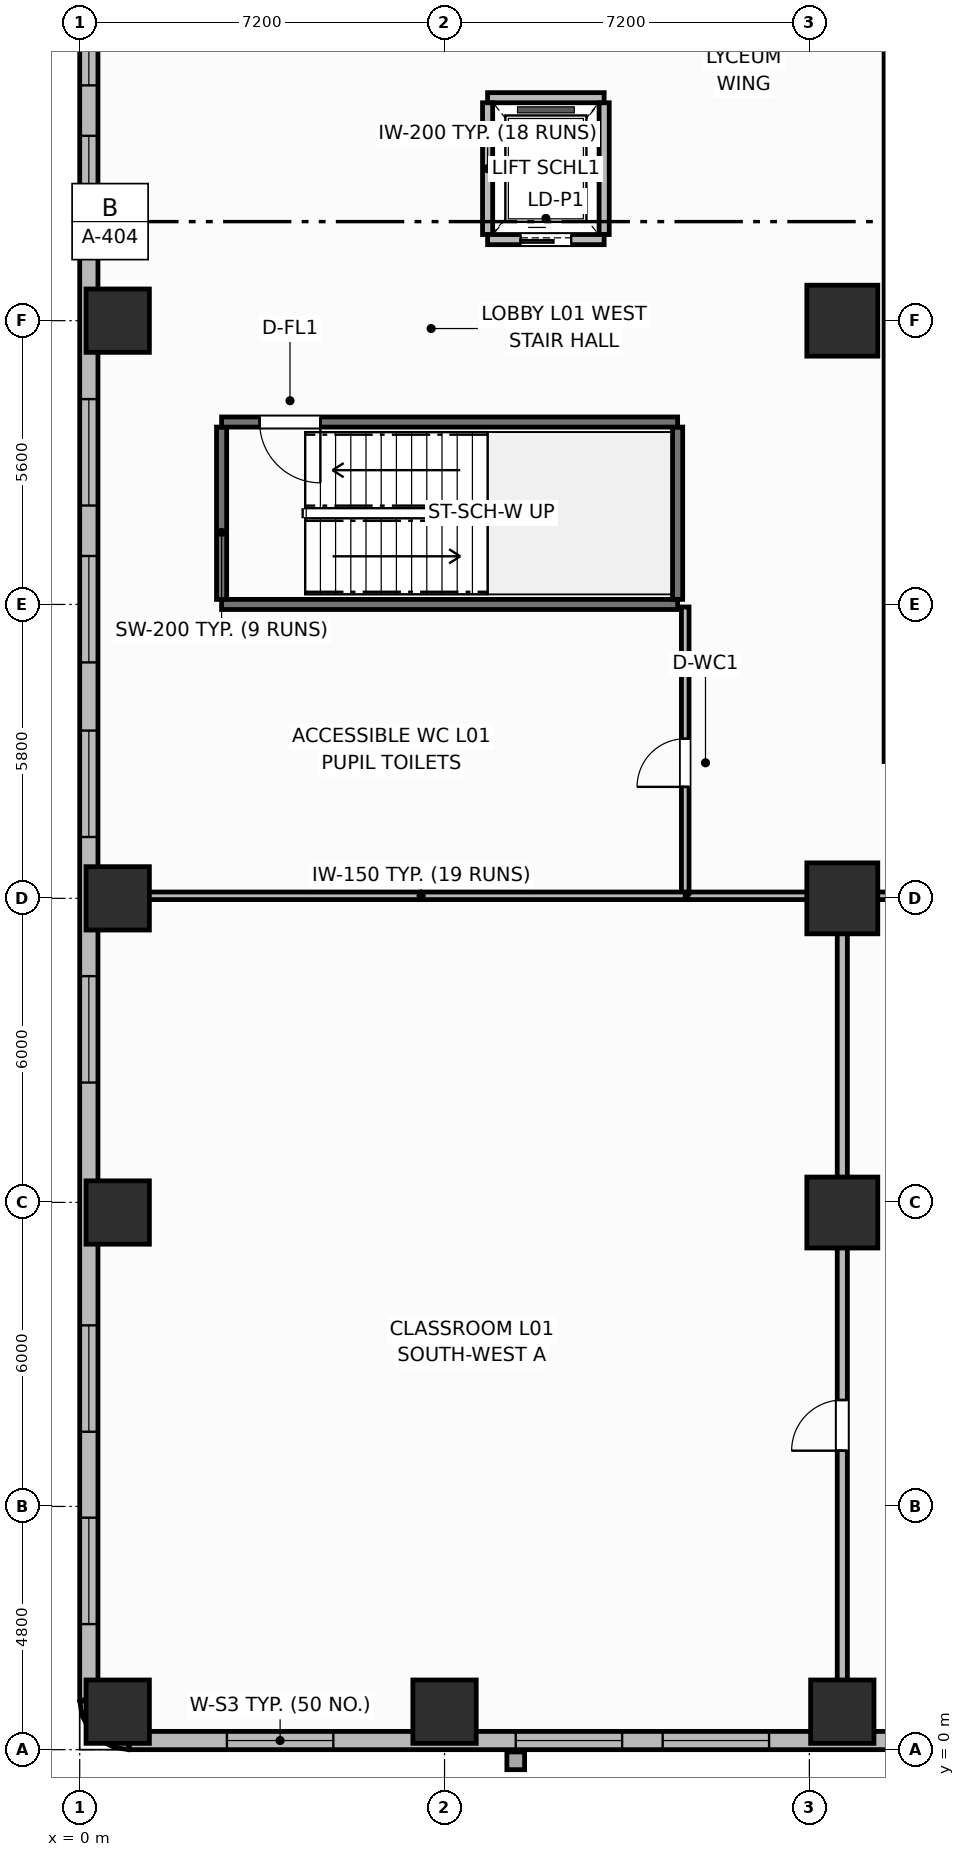
"""IFC4 building model, lengths in metres.
Left out: names, types, materials, properties, quantities, classifications, styles, units other than length and angle.
Written with IfcOpenShell. Run it as: python <this file> out.ifc"""

import sys

from ifc_helpers import new_model, si_unit, direction, frame, frame_2d, origin, origin_2d, place, context, subcontext, project, spatial, rectangle, extrude, element, fill, save


model = new_model("IFC4")
c1 = context("Model", 3, precision=1e-05, world=origin(), true_north=direction((0.0, 1.0)))
c2 = subcontext(c1, "Body", "Model", "MODEL_VIEW")
j1 = project(units=[si_unit("LENGTHUNIT", "METRE"), si_unit("PLANEANGLEUNIT", "RADIAN")], contexts=[c1])
p1 = place(None, origin())
s1 = spatial("IfcSite", under=j1, at=p1, CompositionType="ELEMENT")
p2 = place(p1, origin())
s2 = spatial("IfcBuilding", under=s1, at=p2, CompositionType="ELEMENT")
p3 = place(p2, frame((0.0, 0.0, 6.6)))
s3 = spatial("IfcBuildingStorey", under=s2, at=p3, CompositionType="ELEMENT", Elevation=6.6)
for number, where, z_axis, x_axis in (
    (1, (0.75, 0.75, 0.0), (0.0, 0.0, 1.0), (1.0, 0.0, 0.0)),
    (2, (0.75, 10.6, 0.0), (0.0, 0.0, 1.0), (1.0, 0.0, 0.0)),
    (3, (0.75, 16.8, 0.0), (0.0, 0.0, 1.0), (1.0, 0.0, 0.0)),
    (4, (0.75, 28.2, 0.0), (0.0, 0.0, 1.0), (1.0, 0.0, 0.0)),
    (5, (7.2, 0.75, 0.0), (0.0, 0.0, 1.0), (1.0, 0.0, 0.0)),
    (6, (15.05, 0.75, 0.0), (0.0, 0.0, 1.0), (1.0, 0.0, 0.0)),
):
    element("IfcColumn", number, at=place(p3, frame(where, z_axis=z_axis, x_axis=x_axis)), inside=s3, PredefinedType="COLUMN", context=c2, shape_type="SweptSolid", body=[
        extrude(rectangle(XDim=1.25, YDim=1.25, at=origin_2d()), origin(), (0.0, 0.0, 1.0), 4.5),
    ])
for number, where, z_axis, x_axis in (
    (7, (15.05, 10.6, 0.0), (0.0, 0.0, 1.0), (1.0, 0.0, 0.0)),
    (8, (15.05, 16.8, 0.0), (0.0, 0.0, 1.0), (1.0, 0.0, 0.0)),
    (9, (15.05, 28.2, 0.0), (0.0, 0.0, 1.0), (1.0, 0.0, 0.0)),
):
    element("IfcColumn", number, at=place(p3, frame(where, z_axis=z_axis, x_axis=x_axis)), inside=s3, PredefinedType="COLUMN", context=c2, shape_type="SweptSolid", body=[
        extrude(rectangle(XDim=1.4, YDim=1.4, at=origin_2d()), origin(), (0.0, 0.0, 1.0), 4.5),
    ])
for number, where, z_axis, x_axis in (
    (10, (0.18, 0.98, 0.0), (0.0, 0.0, 1.0), (0.157, -0.988, 0.0)),
    (11, (0.219, 0.733, 0.0), (0.0, 0.0, 1.0), (0.453, -0.891, 0.0)),
    (12, (0.333, 0.51, 0.0), (0.0, 0.0, 1.0), (0.707, -0.707, 0.0)),
    (13, (0.51, 0.333, 0.0), (0.0, 0.0, 1.0), (0.891, -0.453, 0.0)),
    (14, (0.733, 0.219, 0.0), (0.0, 0.0, 1.0), (0.988, -0.157, 0.0)),
):
    element("IfcWall", number, at=place(p3, frame(where, z_axis=z_axis, x_axis=x_axis)), inside=s3, PredefinedType="SOLIDWALL", context=c2, shape_type="SweptSolid", body=[
        extrude(rectangle(XDim=0.25, YDim=0.36, at=frame_2d((0.125, 0.0))), origin(), (0.0, 0.0, 1.0), 3.48),
    ])
p4 = place(p3, frame((0.98, 0.18, 0.0), z_axis=(0.0, 0.0, 1.0), x_axis=(1.0, 0.0, 0.0)))
e15 = element("IfcWall", 15, at=p4, inside=s3, PredefinedType="SOLIDWALL", context=c2, shape_type="SweptSolid", body=[
    extrude(rectangle(XDim=15.25, YDim=0.36, at=frame_2d((7.625, 0.0))), origin(), (0.0, 0.0, 1.0), 3.48),
])
p5 = place(p4, frame((1.925, 0.0, 0.85)))
e16 = element("IfcOpeningElement", 16, at=p5, cuts=e15, PredefinedType="OPENING", context=c2, shape_type="SweptSolid", body=[
    extrude(rectangle(XDim=2.1, YDim=2.2, at=frame_2d((1.05, 1.1))), frame((0.0, 0.19, 0.0), z_axis=(0.0, -1.0, 0.0), x_axis=(1.0, 0.0, 0.0)), (0.0, 0.0, 1.0), 0.38),
])
p6 = place(p4, frame((7.625, 0.0, 0.85)))
e17 = element("IfcOpeningElement", 17, at=p6, cuts=e15, PredefinedType="OPENING", context=c2, shape_type="SweptSolid", body=[
    extrude(rectangle(XDim=2.1, YDim=2.2, at=frame_2d((1.05, 1.1))), frame((0.0, 0.19, 0.0), z_axis=(0.0, -1.0, 0.0), x_axis=(1.0, 0.0, 0.0)), (0.0, 0.0, 1.0), 0.38),
])
p7 = place(p4, frame((10.525, 0.0, 0.85)))
e18 = element("IfcOpeningElement", 18, at=p7, cuts=e15, PredefinedType="OPENING", context=c2, shape_type="SweptSolid", body=[
    extrude(rectangle(XDim=2.1, YDim=2.2, at=frame_2d((1.05, 1.1))), frame((0.0, 0.19, 0.0), z_axis=(0.0, -1.0, 0.0), x_axis=(1.0, 0.0, 0.0)), (0.0, 0.0, 1.0), 0.38),
])
p8 = place(p3, frame((0.18, 55.42, 0.0), z_axis=(0.0, 0.0, 1.0), x_axis=(0.0, -1.0, 0.0)))
e19 = element("IfcWall", 19, at=p8, inside=s3, PredefinedType="SOLIDWALL", context=c2, shape_type="SweptSolid", body=[
    extrude(rectangle(XDim=54.44, YDim=0.36, at=frame_2d((27.22, 0.0))), origin(), (0.0, 0.0, 1.0), 3.48),
])
p9 = place(p8, frame((1.498, 0.0, 0.85)))
e20 = element("IfcOpeningElement", 20, at=p9, cuts=e19, PredefinedType="OPENING", context=c2, shape_type="SweptSolid", body=[
    extrude(rectangle(XDim=2.1, YDim=2.2, at=frame_2d((1.05, 1.1))), frame((0.0, 0.19, 0.0), z_axis=(0.0, -1.0, 0.0), x_axis=(1.0, 0.0, 0.0)), (0.0, 0.0, 1.0), 0.38),
])
p10 = place(p8, frame((5.294, 0.0, 0.85)))
e21 = element("IfcOpeningElement", 21, at=p10, cuts=e19, PredefinedType="OPENING", context=c2, shape_type="SweptSolid", body=[
    extrude(rectangle(XDim=2.1, YDim=2.2, at=frame_2d((1.05, 1.1))), frame((0.0, 0.19, 0.0), z_axis=(0.0, -1.0, 0.0), x_axis=(1.0, 0.0, 0.0)), (0.0, 0.0, 1.0), 0.38),
])
p11 = place(p8, frame((12.185, 0.0, 0.85)))
e22 = element("IfcOpeningElement", 22, at=p11, cuts=e19, PredefinedType="OPENING", context=c2, shape_type="SweptSolid", body=[
    extrude(rectangle(XDim=2.1, YDim=2.2, at=frame_2d((1.05, 1.1))), frame((0.0, 0.19, 0.0), z_axis=(0.0, -1.0, 0.0), x_axis=(1.0, 0.0, 0.0)), (0.0, 0.0, 1.0), 0.38),
])
p12 = place(p8, frame((17.031, 0.0, 0.85)))
e23 = element("IfcOpeningElement", 23, at=p12, cuts=e19, PredefinedType="OPENING", context=c2, shape_type="SweptSolid", body=[
    extrude(rectangle(XDim=2.1, YDim=2.2, at=frame_2d((1.05, 1.1))), frame((0.0, 0.19, 0.0), z_axis=(0.0, -1.0, 0.0), x_axis=(1.0, 0.0, 0.0)), (0.0, 0.0, 1.0), 0.38),
])
p13 = place(p8, frame((20.476, 0.0, 0.85)))
e24 = element("IfcOpeningElement", 24, at=p13, cuts=e19, PredefinedType="OPENING", context=c2, shape_type="SweptSolid", body=[
    extrude(rectangle(XDim=2.1, YDim=2.2, at=frame_2d((1.05, 1.1))), frame((0.0, 0.19, 0.0), z_axis=(0.0, -1.0, 0.0), x_axis=(1.0, 0.0, 0.0)), (0.0, 0.0, 1.0), 0.38),
])
p14 = place(p8, frame((23.572, 0.0, 0.85)))
e25 = element("IfcOpeningElement", 25, at=p14, cuts=e19, PredefinedType="OPENING", context=c2, shape_type="SweptSolid", body=[
    extrude(rectangle(XDim=2.1, YDim=2.2, at=frame_2d((1.05, 1.1))), frame((0.0, 0.19, 0.0), z_axis=(0.0, -1.0, 0.0), x_axis=(1.0, 0.0, 0.0)), (0.0, 0.0, 1.0), 0.38),
])
p15 = place(p8, frame((28.768, 0.0, 0.85)))
e26 = element("IfcOpeningElement", 26, at=p15, cuts=e19, PredefinedType="OPENING", context=c2, shape_type="SweptSolid", body=[
    extrude(rectangle(XDim=2.1, YDim=2.2, at=frame_2d((1.05, 1.1))), frame((0.0, 0.19, 0.0), z_axis=(0.0, -1.0, 0.0), x_axis=(1.0, 0.0, 0.0)), (0.0, 0.0, 1.0), 0.38),
])
p16 = place(p8, frame((31.864, 0.0, 0.85)))
e27 = element("IfcOpeningElement", 27, at=p16, cuts=e19, PredefinedType="OPENING", context=c2, shape_type="SweptSolid", body=[
    extrude(rectangle(XDim=2.1, YDim=2.2, at=frame_2d((1.05, 1.1))), frame((0.0, 0.19, 0.0), z_axis=(0.0, -1.0, 0.0), x_axis=(1.0, 0.0, 0.0)), (0.0, 0.0, 1.0), 0.38),
])
p17 = place(p8, frame((35.309, 0.0, 0.85)))
e28 = element("IfcOpeningElement", 28, at=p17, cuts=e19, PredefinedType="OPENING", context=c2, shape_type="SweptSolid", body=[
    extrude(rectangle(XDim=2.1, YDim=2.2, at=frame_2d((1.05, 1.1))), frame((0.0, 0.19, 0.0), z_axis=(0.0, -1.0, 0.0), x_axis=(1.0, 0.0, 0.0)), (0.0, 0.0, 1.0), 0.38),
])
p18 = place(p8, frame((40.155, 0.0, 0.85)))
e29 = element("IfcOpeningElement", 29, at=p18, cuts=e19, PredefinedType="OPENING", context=c2, shape_type="SweptSolid", body=[
    extrude(rectangle(XDim=2.1, YDim=2.2, at=frame_2d((1.05, 1.1))), frame((0.0, 0.19, 0.0), z_axis=(0.0, -1.0, 0.0), x_axis=(1.0, 0.0, 0.0)), (0.0, 0.0, 1.0), 0.38),
])
p19 = place(p8, frame((47.046, 0.0, 0.85)))
e30 = element("IfcOpeningElement", 30, at=p19, cuts=e19, PredefinedType="OPENING", context=c2, shape_type="SweptSolid", body=[
    extrude(rectangle(XDim=2.1, YDim=2.2, at=frame_2d((1.05, 1.1))), frame((0.0, 0.19, 0.0), z_axis=(0.0, -1.0, 0.0), x_axis=(1.0, 0.0, 0.0)), (0.0, 0.0, 1.0), 0.38),
])
p20 = place(p8, frame((50.842, 0.0, 0.85)))
e31 = element("IfcOpeningElement", 31, at=p20, cuts=e19, PredefinedType="OPENING", context=c2, shape_type="SweptSolid", body=[
    extrude(rectangle(XDim=2.1, YDim=2.2, at=frame_2d((1.05, 1.1))), frame((0.0, 0.19, 0.0), z_axis=(0.0, -1.0, 0.0), x_axis=(1.0, 0.0, 0.0)), (0.0, 0.0, 1.0), 0.38),
])
p21 = place(p3, frame((2.8, 22.6, 0.0), z_axis=(0.0, 0.0, 1.0), x_axis=(1.0, 0.0, 0.0)))
e32 = element("IfcWall", 32, at=p21, inside=s3, PredefinedType="SHEAR", context=c2, shape_type="SweptSolid", body=[
    extrude(rectangle(XDim=9.0, YDim=0.2, at=frame_2d((4.5, 0.0))), origin(), (0.0, 0.0, 1.0), 4.5),
])
for number, where, z_axis, x_axis in (
    (33, (2.8, 22.7, 0.0), (0.0, 0.0, 1.0), (0.0, 1.0, 0.0)),
    (34, (11.8, 22.7, 0.0), (0.0, 0.0, 1.0), (0.0, 1.0, 0.0)),
):
    element("IfcWall", number, at=place(p3, frame(where, z_axis=z_axis, x_axis=x_axis)), inside=s3, PredefinedType="SHEAR", context=c2, shape_type="SweptSolid", body=[
        extrude(rectangle(XDim=3.4, YDim=0.2, at=frame_2d((1.7, 0.0))), origin(), (0.0, 0.0, 1.0), 4.5),
    ])
p22 = place(p3, frame((11.8, 26.2, 0.0), z_axis=(0.0, 0.0, 1.0), x_axis=(-1.0, 0.0, 0.0)))
e35 = element("IfcWall", 35, at=p22, inside=s3, PredefinedType="SHEAR", context=c2, shape_type="SweptSolid", body=[
    extrude(rectangle(XDim=9.0, YDim=0.2, at=frame_2d((4.5, 0.0))), origin(), (0.0, 0.0, 1.0), 4.5),
])
p23 = place(p22, frame((7.05, 0.0, 0.0)))
e36 = element("IfcOpeningElement", 36, at=p23, cuts=e35, PredefinedType="OPENING", context=c2, shape_type="SweptSolid", body=[
    extrude(rectangle(XDim=1.2, YDim=2.15, at=frame_2d((0.6, 1.075))), frame((0.0, 0.11, 0.0), z_axis=(0.0, -1.0, 0.0), x_axis=(1.0, 0.0, 0.0)), (0.0, 0.0, 1.0), 0.22),
])
p24 = place(p3, frame((8.05, 32.6, 0.0), z_axis=(0.0, 0.0, 1.0), x_axis=(1.0, 0.0, 0.0)))
e37 = element("IfcWall", 37, at=p24, inside=s3, PredefinedType="PARTITIONING", context=c2, shape_type="SweptSolid", body=[
    extrude(rectangle(XDim=2.3, YDim=0.2, at=frame_2d((1.15, 0.0))), origin(), (0.0, 0.0, 1.0), 3.42),
])
for number, where, z_axis, x_axis in (
    (38, (8.05, 29.9, 0.0), (0.0, 0.0, 1.0), (0.0, 1.0, 0.0)),
    (39, (10.35, 29.9, 0.0), (0.0, 0.0, 1.0), (0.0, 1.0, 0.0)),
):
    element("IfcWall", number, at=place(p3, frame(where, z_axis=z_axis, x_axis=x_axis)), inside=s3, PredefinedType="PARTITIONING", context=c2, shape_type="SweptSolid", body=[
        extrude(rectangle(XDim=2.6, YDim=0.2, at=frame_2d((1.3, 0.0))), origin(), (0.0, 0.0, 1.0), 3.42),
    ])
p25 = place(p3, frame((8.05, 29.8, 0.0), z_axis=(0.0, 0.0, 1.0), x_axis=(1.0, 0.0, 0.0)))
e40 = element("IfcWall", 40, at=p25, inside=s3, PredefinedType="PARTITIONING", context=c2, shape_type="SweptSolid", body=[
    extrude(rectangle(XDim=2.3, YDim=0.2, at=frame_2d((1.15, 0.0))), origin(), (0.0, 0.0, 1.0), 3.42),
])
p26 = place(p25, frame((0.65, 0.0, 0.0)))
e41 = element("IfcOpeningElement", 41, at=p26, cuts=e40, PredefinedType="OPENING", context=c2, shape_type="SweptSolid", body=[
    extrude(rectangle(XDim=1.0, YDim=2.15, at=frame_2d((0.5, 1.075))), frame((0.0, 0.11, 0.0), z_axis=(0.0, -1.0, 0.0), x_axis=(1.0, 0.0, 0.0)), (0.0, 0.0, 1.0), 0.22),
])
p27 = place(p3, frame((15.95, 19.5, 0.0), z_axis=(0.0, 0.0, 1.0), x_axis=(0.0, 1.0, 0.0)))
e42 = element("IfcWall", 42, at=p27, inside=s3, PredefinedType="PARTITIONING", context=c2, shape_type="SweptSolid", body=[
    extrude(rectangle(XDim=17.4, YDim=0.15, at=frame_2d((8.7, 0.0))), origin(), (0.0, 0.0, 1.0), 3.42),
])
p28 = place(p3, frame((15.05, 0.4, 0.0), z_axis=(0.0, 0.0, 1.0), x_axis=(0.0, 1.0, 0.0)))
e43 = element("IfcWall", 43, at=p28, inside=s3, PredefinedType="PARTITIONING", context=c2, shape_type="SweptSolid", body=[
    extrude(rectangle(XDim=16.4, YDim=0.2, at=frame_2d((8.2, 0.0))), origin(), (0.0, 0.0, 1.0), 3.42),
])
p29 = place(p28, frame((5.5, 0.0, 0.0)))
e44 = element("IfcOpeningElement", 44, at=p29, cuts=e43, PredefinedType="OPENING", context=c2, shape_type="SweptSolid", body=[
    extrude(rectangle(XDim=1.0, YDim=2.15, at=frame_2d((0.5, 1.075))), frame((0.0, 0.11, 0.0), z_axis=(0.0, -1.0, 0.0), x_axis=(1.0, 0.0, 0.0)), (0.0, 0.0, 1.0), 0.22),
])
p30 = place(p3, frame((12.0, 16.85, 0.0), z_axis=(0.0, 0.0, 1.0), x_axis=(1.0, 0.0, 0.0)))
e45 = element("IfcWall", 45, at=p30, inside=s3, PredefinedType="PARTITIONING", context=c2, shape_type="SweptSolid", body=[
    extrude(rectangle(XDim=13.25, YDim=0.15, at=frame_2d((6.625, 0.0))), origin(), (0.0, 0.0, 1.0), 3.42),
])
p31 = place(p30, frame((7.5, 0.0, 0.0)))
e46 = element("IfcOpeningElement", 46, at=p31, cuts=e45, PredefinedType="OPENING", context=c2, shape_type="SweptSolid", body=[
    extrude(rectangle(XDim=1.0, YDim=2.15, at=frame_2d((0.5, 1.075))), frame((0.0, 0.085, 0.0), z_axis=(0.0, -1.0, 0.0), x_axis=(1.0, 0.0, 0.0)), (0.0, 0.0, 1.0), 0.17),
])
p32 = place(p3, frame((11.95, 16.9, 0.0), z_axis=(0.0, 0.0, 1.0), x_axis=(0.0, 1.0, 0.0)))
e47 = element("IfcWall", 47, at=p32, inside=s3, PredefinedType="PARTITIONING", context=c2, shape_type="SweptSolid", body=[
    extrude(rectangle(XDim=5.65, YDim=0.15, at=frame_2d((2.825, 0.0))), origin(), (0.0, 0.0, 1.0), 3.42),
])
p33 = place(p32, frame((2.1, 0.0, 0.0)))
e48 = element("IfcOpeningElement", 48, at=p33, cuts=e47, PredefinedType="OPENING", context=c2, shape_type="SweptSolid", body=[
    extrude(rectangle(XDim=0.95, YDim=2.1, at=frame_2d((0.475, 1.05))), frame((0.0, 0.085, 0.0), z_axis=(0.0, -1.0, 0.0), x_axis=(1.0, 0.0, 0.0)), (0.0, 0.0, 1.0), 0.17),
])
p34 = place(p3, frame((0.4, 16.85, 0.0), z_axis=(0.0, 0.0, 1.0), x_axis=(1.0, 0.0, 0.0)))
e49 = element("IfcWall", 49, at=p34, inside=s3, PredefinedType="PARTITIONING", context=c2, shape_type="SweptSolid", body=[
    extrude(rectangle(XDim=11.55, YDim=0.15, at=frame_2d((5.775, 0.0))), origin(), (0.0, 0.0, 1.0), 3.42),
])
p35 = place(p5, origin())
e50 = element("IfcWindow", 50, at=p35, inside=s3, PartitioningType="SINGLE_PANEL", PredefinedType="WINDOW", context=c2, shape_type="SweptSolid", body=[
    extrude(rectangle(XDim=2.1, YDim=2.2, at=frame_2d((1.05, 1.1))), frame((0.0, 0.03, 0.0), z_axis=(0.0, -1.0, 0.0), x_axis=(1.0, 0.0, 0.0)), (0.0, 0.0, 1.0), 0.06),
])
fill(e16, e50)
p36 = place(p6, origin())
e51 = element("IfcWindow", 51, at=p36, inside=s3, PartitioningType="SINGLE_PANEL", PredefinedType="WINDOW", context=c2, shape_type="SweptSolid", body=[
    extrude(rectangle(XDim=2.1, YDim=2.2, at=frame_2d((1.05, 1.1))), frame((0.0, 0.03, 0.0), z_axis=(0.0, -1.0, 0.0), x_axis=(1.0, 0.0, 0.0)), (0.0, 0.0, 1.0), 0.06),
])
fill(e17, e51)
p37 = place(p7, origin())
e52 = element("IfcWindow", 52, at=p37, inside=s3, PartitioningType="SINGLE_PANEL", PredefinedType="WINDOW", context=c2, shape_type="SweptSolid", body=[
    extrude(rectangle(XDim=2.1, YDim=2.2, at=frame_2d((1.05, 1.1))), frame((0.0, 0.03, 0.0), z_axis=(0.0, -1.0, 0.0), x_axis=(1.0, 0.0, 0.0)), (0.0, 0.0, 1.0), 0.06),
])
fill(e18, e52)
p38 = place(p13, origin())
e53 = element("IfcWindow", 53, at=p38, inside=s3, PartitioningType="SINGLE_PANEL", PredefinedType="WINDOW", context=c2, shape_type="SweptSolid", body=[
    extrude(rectangle(XDim=2.1, YDim=2.2, at=frame_2d((1.05, 1.1))), frame((0.0, 0.03, 0.0), z_axis=(0.0, -1.0, 0.0), x_axis=(1.0, 0.0, 0.0)), (0.0, 0.0, 1.0), 0.06),
])
fill(e24, e53)
p39 = place(p14, origin())
e54 = element("IfcWindow", 54, at=p39, inside=s3, PartitioningType="SINGLE_PANEL", PredefinedType="WINDOW", context=c2, shape_type="SweptSolid", body=[
    extrude(rectangle(XDim=2.1, YDim=2.2, at=frame_2d((1.05, 1.1))), frame((0.0, 0.03, 0.0), z_axis=(0.0, -1.0, 0.0), x_axis=(1.0, 0.0, 0.0)), (0.0, 0.0, 1.0), 0.06),
])
fill(e25, e54)
p40 = place(p15, origin())
e55 = element("IfcWindow", 55, at=p40, inside=s3, PartitioningType="SINGLE_PANEL", PredefinedType="WINDOW", context=c2, shape_type="SweptSolid", body=[
    extrude(rectangle(XDim=2.1, YDim=2.2, at=frame_2d((1.05, 1.1))), frame((0.0, 0.03, 0.0), z_axis=(0.0, -1.0, 0.0), x_axis=(1.0, 0.0, 0.0)), (0.0, 0.0, 1.0), 0.06),
])
fill(e26, e55)
p41 = place(p16, origin())
e56 = element("IfcWindow", 56, at=p41, inside=s3, PartitioningType="SINGLE_PANEL", PredefinedType="WINDOW", context=c2, shape_type="SweptSolid", body=[
    extrude(rectangle(XDim=2.1, YDim=2.2, at=frame_2d((1.05, 1.1))), frame((0.0, 0.03, 0.0), z_axis=(0.0, -1.0, 0.0), x_axis=(1.0, 0.0, 0.0)), (0.0, 0.0, 1.0), 0.06),
])
fill(e27, e56)
p42 = place(p17, origin())
e57 = element("IfcWindow", 57, at=p42, inside=s3, PartitioningType="SINGLE_PANEL", PredefinedType="WINDOW", context=c2, shape_type="SweptSolid", body=[
    extrude(rectangle(XDim=2.1, YDim=2.2, at=frame_2d((1.05, 1.1))), frame((0.0, 0.03, 0.0), z_axis=(0.0, -1.0, 0.0), x_axis=(1.0, 0.0, 0.0)), (0.0, 0.0, 1.0), 0.06),
])
fill(e28, e57)
p43 = place(p18, origin())
e58 = element("IfcWindow", 58, at=p43, inside=s3, PartitioningType="SINGLE_PANEL", PredefinedType="WINDOW", context=c2, shape_type="SweptSolid", body=[
    extrude(rectangle(XDim=2.1, YDim=2.2, at=frame_2d((1.05, 1.1))), frame((0.0, 0.03, 0.0), z_axis=(0.0, -1.0, 0.0), x_axis=(1.0, 0.0, 0.0)), (0.0, 0.0, 1.0), 0.06),
])
fill(e29, e58)
p44 = place(p19, origin())
e59 = element("IfcWindow", 59, at=p44, inside=s3, PartitioningType="SINGLE_PANEL", PredefinedType="WINDOW", context=c2, shape_type="SweptSolid", body=[
    extrude(rectangle(XDim=2.1, YDim=2.2, at=frame_2d((1.05, 1.1))), frame((0.0, 0.03, 0.0), z_axis=(0.0, -1.0, 0.0), x_axis=(1.0, 0.0, 0.0)), (0.0, 0.0, 1.0), 0.06),
])
fill(e30, e59)
p45 = place(p20, origin())
e60 = element("IfcWindow", 60, at=p45, inside=s3, PartitioningType="SINGLE_PANEL", PredefinedType="WINDOW", context=c2, shape_type="SweptSolid", body=[
    extrude(rectangle(XDim=2.1, YDim=2.2, at=frame_2d((1.05, 1.1))), frame((0.0, 0.03, 0.0), z_axis=(0.0, -1.0, 0.0), x_axis=(1.0, 0.0, 0.0)), (0.0, 0.0, 1.0), 0.06),
])
fill(e31, e60)
p46 = place(p23, origin())
e61 = element("IfcDoor", 61, at=p46, inside=s3, OperationType="SINGLE_SWING_LEFT", PredefinedType="DOOR", context=c2, shape_type="SweptSolid", body=[
    extrude(rectangle(XDim=1.2, YDim=2.15, at=frame_2d((0.6, 1.075))), frame((0.0, 0.025, 0.0), z_axis=(0.0, -1.0, 0.0), x_axis=(1.0, 0.0, 0.0)), (0.0, 0.0, 1.0), 0.05),
])
fill(e36, e61)
p47 = place(p26, origin())
e62 = element("IfcDoor", 62, at=p47, inside=s3, OperationType="SLIDING_TO_LEFT", PredefinedType="DOOR", context=c2, shape_type="SweptSolid", body=[
    extrude(rectangle(XDim=1.0, YDim=2.15, at=frame_2d((0.5, 1.075))), frame((0.0, 0.025, 0.0), z_axis=(0.0, -1.0, 0.0), x_axis=(1.0, 0.0, 0.0)), (0.0, 0.0, 1.0), 0.05),
])
fill(e41, e62)
p48 = place(p29, origin())
e63 = element("IfcDoor", 63, at=p48, inside=s3, OperationType="SINGLE_SWING_LEFT", PredefinedType="DOOR", context=c2, shape_type="SweptSolid", body=[
    extrude(rectangle(XDim=1.0, YDim=2.15, at=frame_2d((0.5, 1.075))), frame((0.0, 0.025, 0.0), z_axis=(0.0, -1.0, 0.0), x_axis=(1.0, 0.0, 0.0)), (0.0, 0.0, 1.0), 0.05),
])
fill(e44, e63)
p49 = place(p33, origin())
e64 = element("IfcDoor", 64, at=p49, inside=s3, OperationType="SINGLE_SWING_LEFT", PredefinedType="DOOR", context=c2, shape_type="SweptSolid", body=[
    extrude(rectangle(XDim=0.95, YDim=2.1, at=frame_2d((0.475, 1.05))), frame((0.0, 0.025, 0.0), z_axis=(0.0, -1.0, 0.0), x_axis=(1.0, 0.0, 0.0)), (0.0, 0.0, 1.0), 0.05),
])
fill(e48, e64)
save(model, sys.argv[1])
